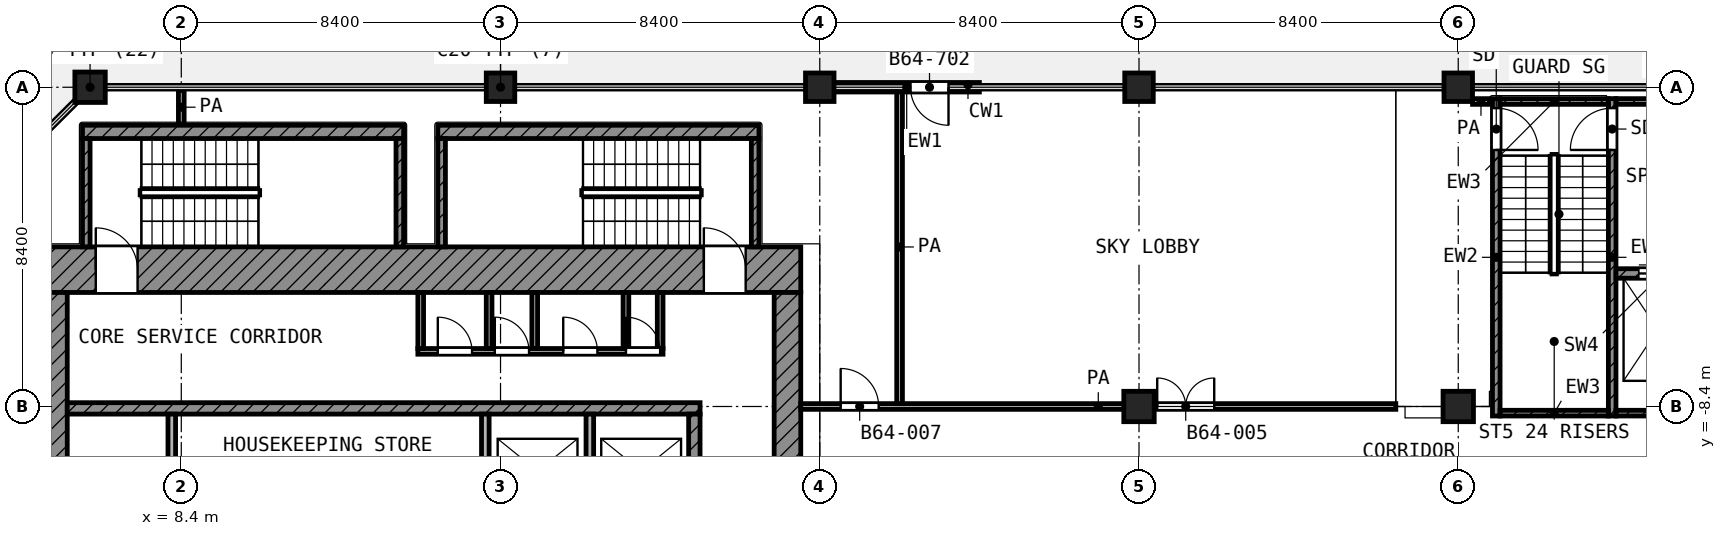
"""IFC4 building model, lengths in metres.
Left out: names, types, materials, properties, quantities, classifications, styles, units other than length and angle.
Written with IfcOpenShell. Run it as: python <this file> out.ifc"""

import sys

from ifc_helpers import new_model, si_unit, direction, frame, frame_2d, origin, origin_2d, place, context, subcontext, project, spatial, rectangle, extrude, element, fill, save


model = new_model("IFC4")
c1 = context("Model", 3, precision=1e-05, world=origin(), true_north=direction((0.0, 1.0)))
c2 = subcontext(c1, "Body", "Model", "MODEL_VIEW")
j1 = project(units=[si_unit("LENGTHUNIT", "METRE"), si_unit("PLANEANGLEUNIT", "RADIAN")], contexts=[c1])
p1 = place(None, origin())
s1 = spatial("IfcSite", under=j1, at=p1, CompositionType="ELEMENT")
p2 = place(p1, origin())
s2 = spatial("IfcBuilding", under=s1, at=p2, CompositionType="ELEMENT")
p3 = place(p2, frame((0.0, 0.0, 277.6)))
s3 = spatial("IfcBuildingStorey", under=s2, at=p3, CompositionType="ELEMENT", Elevation=277.6)
p4 = place(p3, frame((6.0, 0.0, 0.0), z_axis=(0.0, 0.0, 1.0), x_axis=(1.0, 0.0, 0.0)))
e1 = element("IfcColumn", 1, at=p4, inside=s3, PredefinedType="COLUMN", context=c2, shape_type="SweptSolid", body=[
    extrude(rectangle(XDim=0.8, YDim=0.8, at=origin_2d()), origin(), (0.0, 0.0, 1.0), 4.2),
])
for number, where, z_axis, x_axis in (
    (2, (16.8, 0.0, 0.0), (0.0, 0.0, 1.0), (1.0, 0.0, 0.0)),
    (3, (25.2, 0.0, 0.0), (0.0, 0.0, 1.0), (1.0, 0.0, 0.0)),
    (4, (33.6, 0.0, 0.0), (0.0, 0.0, 1.0), (1.0, 0.0, 0.0)),
    (5, (42.0, 0.0, 0.0), (0.0, 0.0, 1.0), (1.0, 0.0, 0.0)),
):
    element("IfcColumn", number, at=place(p3, frame(where, z_axis=z_axis, x_axis=x_axis)), inside=s3, PredefinedType="COLUMN", context=c2, shape_type="SweptSolid", body=[
        extrude(rectangle(XDim=0.75, YDim=0.75, at=origin_2d()), origin(), (0.0, 0.0, 1.0), 4.2),
    ])
for number, where, z_axis, x_axis in (
    (6, (33.6, -8.4, 0.0), (0.0, 0.0, 1.0), (1.0, 0.0, 0.0)),
    (7, (42.0, -8.4, 0.0), (0.0, 0.0, 1.0), (1.0, 0.0, 0.0)),
):
    element("IfcColumn", number, at=place(p3, frame(where, z_axis=z_axis, x_axis=x_axis)), inside=s3, PredefinedType="COLUMN", context=c2, shape_type="SweptSolid", body=[
        extrude(rectangle(XDim=0.8, YDim=0.8, at=origin_2d()), origin(), (0.0, 0.0, 1.0), 4.2),
    ])
p5 = place(p3, frame((29.4, 0.0, 0.0), z_axis=(0.0, 0.0, 1.0), x_axis=(-1.0, 0.0, 0.0)))
e8 = element("IfcWall", 8, at=p5, inside=s3, PredefinedType="SOLIDWALL", context=c2, shape_type="SweptSolid", body=[
    extrude(rectangle(XDim=3.825, YDim=0.25, at=frame_2d((1.913, 0.0))), origin(), (0.0, 0.0, 1.0), 3.48),
])
p6 = place(p5, frame((0.812, 0.0, 0.0)))
e9 = element("IfcOpeningElement", 9, at=p6, cuts=e8, PredefinedType="OPENING", context=c2, shape_type="SweptSolid", body=[
    extrude(rectangle(XDim=1.0, YDim=2.1, at=frame_2d((0.5, 1.05))), frame((0.0, 0.135, 0.0), z_axis=(0.0, -1.0, 0.0), x_axis=(1.0, 0.0, 0.0)), (0.0, 0.0, 1.0), 0.27),
])
p7 = place(p3, frame((4.2, -4.8, 0.0), z_axis=(0.0, 0.0, 1.0), x_axis=(1.0, 0.0, 0.0)))
e10 = element("IfcWall", 10, at=p7, inside=s3, PredefinedType="SHEAR", context=c2, shape_type="SweptSolid", body=[
    extrude(rectangle(XDim=20.5, YDim=1.2, at=frame_2d((10.25, 0.0))), origin(), (0.0, 0.0, 1.0), 3.6),
])
p8 = place(p7, frame((1.95, 0.0, 0.0)))
e11 = element("IfcOpeningElement", 11, at=p8, cuts=e10, PredefinedType="OPENING", context=c2, shape_type="SweptSolid", body=[
    extrude(rectangle(XDim=1.1, YDim=2.1, at=frame_2d((0.55, 1.05))), frame((0.0, 0.61, 0.0), z_axis=(0.0, -1.0, 0.0), x_axis=(1.0, 0.0, 0.0)), (0.0, 0.0, 1.0), 1.22),
])
p9 = place(p7, frame((17.95, 0.0, 0.0)))
e12 = element("IfcOpeningElement", 12, at=p9, cuts=e10, PredefinedType="OPENING", context=c2, shape_type="SweptSolid", body=[
    extrude(rectangle(XDim=1.1, YDim=2.1, at=frame_2d((0.55, 1.05))), frame((0.0, 0.61, 0.0), z_axis=(0.0, -1.0, 0.0), x_axis=(1.0, 0.0, 0.0)), (0.0, 0.0, 1.0), 1.22),
])
p10 = place(p3, frame((4.8, -24.7, 0.0), z_axis=(0.0, 0.0, 1.0), x_axis=(0.0, 1.0, 0.0)))
e13 = element("IfcWall", 13, at=p10, inside=s3, PredefinedType="SHEAR", context=c2, shape_type="SweptSolid", body=[
    extrude(rectangle(XDim=19.3, YDim=1.2, at=frame_2d((9.65, 0.0))), origin(), (0.0, 0.0, 1.0), 3.6),
])
p11 = place(p10, frame((11.15, 0.0, 0.0)))
e14 = element("IfcOpeningElement", 14, at=p11, cuts=e13, PredefinedType="OPENING", context=c2, shape_type="SweptSolid", body=[
    extrude(rectangle(XDim=1.1, YDim=2.1, at=frame_2d((0.55, 1.05))), frame((0.0, 0.61, 0.0), z_axis=(0.0, -1.0, 0.0), x_axis=(1.0, 0.0, 0.0)), (0.0, 0.0, 1.0), 1.22),
])
p12 = place(p10, frame((1.85, 0.0, 0.0)))
e15 = element("IfcOpeningElement", 15, at=p12, cuts=e13, PredefinedType="OPENING", context=c2, shape_type="SweptSolid", body=[
    extrude(rectangle(XDim=1.1, YDim=2.1, at=frame_2d((0.55, 1.05))), frame((0.0, 0.61, 0.0), z_axis=(0.0, -1.0, 0.0), x_axis=(1.0, 0.0, 0.0)), (0.0, 0.0, 1.0), 1.22),
])
p13 = place(p3, frame((24.35, -24.0, 0.0), z_axis=(0.0, 0.0, 1.0), x_axis=(0.0, 1.0, 0.0)))
e16 = element("IfcWall", 16, at=p13, inside=s3, PredefinedType="SHEAR", context=c2, shape_type="SweptSolid", body=[
    extrude(rectangle(XDim=18.6, YDim=0.7, at=frame_2d((9.3, 0.0))), origin(), (0.0, 0.0, 1.0), 3.6),
])
p14 = place(p13, frame((10.5, 0.0, 0.0)))
e17 = element("IfcOpeningElement", 17, at=p14, cuts=e16, PredefinedType="OPENING", context=c2, shape_type="SweptSolid", body=[
    extrude(rectangle(XDim=1.8, YDim=2.1, at=frame_2d((0.9, 1.05))), frame((0.0, 0.36, 0.0), z_axis=(0.0, -1.0, 0.0), x_axis=(1.0, 0.0, 0.0)), (0.0, 0.0, 1.0), 0.72),
])
p15 = place(p3, frame((5.4, -8.45, 0.0), z_axis=(0.0, 0.0, 1.0), x_axis=(1.0, 0.0, 0.0)))
e18 = element("IfcWall", 18, at=p15, inside=s3, PredefinedType="SHEAR", context=c2, shape_type="SweptSolid", body=[
    extrude(rectangle(XDim=16.65, YDim=0.3, at=frame_2d((8.325, 0.0))), origin(), (0.0, 0.0, 1.0), 3.6),
])
p16 = place(p3, frame((21.9, -10.95, 0.0), z_axis=(0.0, 0.0, 1.0), x_axis=(0.0, 1.0, 0.0)))
e19 = element("IfcWall", 19, at=p16, inside=s3, PredefinedType="SHEAR", context=c2, shape_type="SweptSolid", body=[
    extrude(rectangle(XDim=2.35, YDim=0.3, at=frame_2d((1.175, 0.0))), origin(), (0.0, 0.0, 1.0), 3.6),
])
for number, where, z_axis, x_axis in (
    (20, (8.15, -10.95, 0.0), (0.0, 0.0, 1.0), (0.0, 1.0, 0.0)),
    (21, (16.4, -10.95, 0.0), (0.0, 0.0, 1.0), (0.0, 1.0, 0.0)),
    (22, (19.15, -10.95, 0.0), (0.0, 0.0, 1.0), (0.0, 1.0, 0.0)),
):
    element("IfcWall", number, at=place(p3, frame(where, z_axis=z_axis, x_axis=x_axis)), inside=s3, PredefinedType="PARTITIONING", context=c2, shape_type="SweptSolid", body=[
        extrude(rectangle(XDim=2.35, YDim=0.2, at=frame_2d((1.175, 0.0))), origin(), (0.0, 0.0, 1.0), 3.6),
    ])
p17 = place(p3, frame((14.625, -6.95, 0.0), z_axis=(0.0, 0.0, 1.0), x_axis=(1.0, 0.0, 0.0)))
e23 = element("IfcWall", 23, at=p17, inside=s3, PredefinedType="PARTITIONING", context=c2, shape_type="SweptSolid", body=[
    extrude(rectangle(XDim=6.45, YDim=0.15, at=frame_2d((3.225, 0.0))), origin(), (0.0, 0.0, 1.0), 3.6),
])
p18 = place(p17, frame((0.525, 0.0, 0.0)))
e24 = element("IfcOpeningElement", 24, at=p18, cuts=e23, PredefinedType="OPENING", context=c2, shape_type="SweptSolid", body=[
    extrude(rectangle(XDim=0.9, YDim=2.1, at=frame_2d((0.45, 1.05))), frame((0.0, 0.085, 0.0), z_axis=(0.0, -1.0, 0.0), x_axis=(1.0, 0.0, 0.0)), (0.0, 0.0, 1.0), 0.17),
])
p19 = place(p17, frame((2.025, 0.0, 0.0)))
e25 = element("IfcOpeningElement", 25, at=p19, cuts=e23, PredefinedType="OPENING", context=c2, shape_type="SweptSolid", body=[
    extrude(rectangle(XDim=0.9, YDim=2.1, at=frame_2d((0.45, 1.05))), frame((0.0, 0.085, 0.0), z_axis=(0.0, -1.0, 0.0), x_axis=(1.0, 0.0, 0.0)), (0.0, 0.0, 1.0), 0.17),
])
p20 = place(p17, frame((3.825, 0.0, 0.0)))
e26 = element("IfcOpeningElement", 26, at=p20, cuts=e23, PredefinedType="OPENING", context=c2, shape_type="SweptSolid", body=[
    extrude(rectangle(XDim=0.9, YDim=2.1, at=frame_2d((0.45, 1.05))), frame((0.0, 0.085, 0.0), z_axis=(0.0, -1.0, 0.0), x_axis=(1.0, 0.0, 0.0)), (0.0, 0.0, 1.0), 0.17),
])
p21 = place(p17, frame((5.475, 0.0, 0.0)))
e27 = element("IfcOpeningElement", 27, at=p21, cuts=e23, PredefinedType="OPENING", context=c2, shape_type="SweptSolid", body=[
    extrude(rectangle(XDim=0.9, YDim=2.1, at=frame_2d((0.45, 1.05))), frame((0.0, 0.085, 0.0), z_axis=(0.0, -1.0, 0.0), x_axis=(1.0, 0.0, 0.0)), (0.0, 0.0, 1.0), 0.17),
])
for number, where, z_axis, x_axis in (
    (28, (14.7, -6.875, 0.0), (0.0, 0.0, 1.0), (0.0, 1.0, 0.0)),
    (29, (16.5, -6.875, 0.0), (0.0, 0.0, 1.0), (0.0, 1.0, 0.0)),
    (30, (17.7, -6.875, 0.0), (0.0, 0.0, 1.0), (0.0, 1.0, 0.0)),
    (31, (20.1, -6.875, 0.0), (0.0, 0.0, 1.0), (0.0, 1.0, 0.0)),
    (32, (21.0, -6.875, 0.0), (0.0, 0.0, 1.0), (0.0, 1.0, 0.0)),
):
    element("IfcWall", number, at=place(p3, frame(where, z_axis=z_axis, x_axis=x_axis)), inside=s3, PredefinedType="PARTITIONING", context=c2, shape_type="SweptSolid", body=[
        extrude(rectangle(XDim=1.475, YDim=0.15, at=frame_2d((0.738, 0.0))), origin(), (0.0, 0.0, 1.0), 3.6),
    ])
p22 = place(p3, frame((5.8, -1.175, 0.0), z_axis=(0.0, 0.0, 1.0), x_axis=(1.0, 0.0, 0.0)))
e33 = element("IfcWall", 33, at=p22, inside=s3, PredefinedType="SHEAR", context=c2, shape_type="SweptSolid", body=[
    extrude(rectangle(XDim=8.45, YDim=0.35, at=frame_2d((4.225, 0.0))), origin(), (0.0, 0.0, 1.0), 3.6),
])
for number, where, z_axis, x_axis in (
    (34, (5.9, -4.2, 0.0), (0.0, 0.0, 1.0), (0.0, 1.0, 0.0)),
    (35, (14.15, -4.2, 0.0), (0.0, 0.0, 1.0), (0.0, 1.0, 0.0)),
):
    element("IfcWall", number, at=place(p3, frame(where, z_axis=z_axis, x_axis=x_axis)), inside=s3, PredefinedType="SHEAR", context=c2, shape_type="SweptSolid", body=[
        extrude(rectangle(XDim=2.85, YDim=0.2, at=frame_2d((1.425, 0.0))), origin(), (0.0, 0.0, 1.0), 3.6),
    ])
p23 = place(p3, frame((15.15, -1.175, 0.0), z_axis=(0.0, 0.0, 1.0), x_axis=(1.0, 0.0, 0.0)))
e36 = element("IfcWall", 36, at=p23, inside=s3, PredefinedType="SHEAR", context=c2, shape_type="SweptSolid", body=[
    extrude(rectangle(XDim=8.45, YDim=0.35, at=frame_2d((4.225, 0.0))), origin(), (0.0, 0.0, 1.0), 3.6),
])
for number, where, z_axis, x_axis in (
    (37, (15.25, -4.2, 0.0), (0.0, 0.0, 1.0), (0.0, 1.0, 0.0)),
    (38, (23.5, -4.2, 0.0), (0.0, 0.0, 1.0), (0.0, 1.0, 0.0)),
):
    element("IfcWall", number, at=place(p3, frame(where, z_axis=z_axis, x_axis=x_axis)), inside=s3, PredefinedType="SHEAR", context=c2, shape_type="SweptSolid", body=[
        extrude(rectangle(XDim=2.85, YDim=0.2, at=frame_2d((1.425, 0.0))), origin(), (0.0, 0.0, 1.0), 3.6),
    ])
p24 = place(p3, frame((43.0, -8.65, 0.0), z_axis=(0.0, 0.0, 1.0), x_axis=(0.0, 1.0, 0.0)))
e39 = element("IfcWall", 39, at=p24, inside=s3, PredefinedType="SHEAR", context=c2, shape_type="SweptSolid", body=[
    extrude(rectangle(XDim=8.35, YDim=0.2, at=frame_2d((4.175, 0.0))), origin(), (0.0, 0.0, 1.0), 3.6),
])
p25 = place(p24, frame((7.0, 0.0, 0.0)))
e40 = element("IfcOpeningElement", 40, at=p25, cuts=e39, PredefinedType="OPENING", context=c2, shape_type="SweptSolid", body=[
    extrude(rectangle(XDim=1.1, YDim=2.1, at=frame_2d((0.55, 1.05))), frame((0.0, 0.11, 0.0), z_axis=(0.0, -1.0, 0.0), x_axis=(1.0, 0.0, 0.0)), (0.0, 0.0, 1.0), 0.22),
])
p26 = place(p3, frame((46.05, -8.65, 0.0), z_axis=(0.0, 0.0, 1.0), x_axis=(0.0, 1.0, 0.0)))
e41 = element("IfcWall", 41, at=p26, inside=s3, PredefinedType="SHEAR", context=c2, shape_type="SweptSolid", body=[
    extrude(rectangle(XDim=8.35, YDim=0.2, at=frame_2d((4.175, 0.0))), origin(), (0.0, 0.0, 1.0), 3.6),
])
p27 = place(p26, frame((7.0, 0.0, 0.0)))
e42 = element("IfcOpeningElement", 42, at=p27, cuts=e41, PredefinedType="OPENING", context=c2, shape_type="SweptSolid", body=[
    extrude(rectangle(XDim=1.1, YDim=2.1, at=frame_2d((0.55, 1.05))), frame((0.0, 0.11, 0.0), z_axis=(0.0, -1.0, 0.0), x_axis=(1.0, 0.0, 0.0)), (0.0, 0.0, 1.0), 0.22),
])
p28 = place(p3, frame((43.1, -0.375, 0.0), z_axis=(0.0, 0.0, 1.0), x_axis=(1.0, 0.0, 0.0)))
e43 = element("IfcWall", 43, at=p28, inside=s3, PredefinedType="SHEAR", context=c2, shape_type="SweptSolid", body=[
    extrude(rectangle(XDim=2.85, YDim=0.15, at=frame_2d((1.425, 0.0))), origin(), (0.0, 0.0, 1.0), 3.6),
])
p29 = place(p3, frame((46.15, -0.375, 0.0), z_axis=(0.0, 0.0, 1.0), x_axis=(1.0, 0.0, 0.0)))
e44 = element("IfcWall", 44, at=p29, inside=s3, PredefinedType="SHEAR", context=c2, shape_type="SweptSolid", body=[
    extrude(rectangle(XDim=2.45, YDim=0.15, at=frame_2d((1.225, 0.0))), origin(), (0.0, 0.0, 1.0), 3.6),
])
p30 = place(p3, frame((43.1, -8.575, 0.0), z_axis=(0.0, 0.0, 1.0), x_axis=(1.0, 0.0, 0.0)))
e45 = element("IfcWall", 45, at=p30, inside=s3, PredefinedType="SHEAR", context=c2, shape_type="SweptSolid", body=[
    extrude(rectangle(XDim=2.85, YDim=0.15, at=frame_2d((1.425, 0.0))), origin(), (0.0, 0.0, 1.0), 3.6),
])
p31 = place(p3, frame((46.15, -8.575, 0.0), z_axis=(0.0, 0.0, 1.0), x_axis=(1.0, 0.0, 0.0)))
e46 = element("IfcWall", 46, at=p31, inside=s3, PredefinedType="SHEAR", context=c2, shape_type="SweptSolid", body=[
    extrude(rectangle(XDim=2.45, YDim=0.15, at=frame_2d((1.225, 0.0))), origin(), (0.0, 0.0, 1.0), 3.6),
])
p32 = place(p3, frame((46.15, -4.9, 0.0), z_axis=(0.0, 0.0, 1.0), x_axis=(1.0, 0.0, 0.0)))
e47 = element("IfcWall", 47, at=p32, inside=s3, PredefinedType="SHEAR", context=c2, shape_type="SweptSolid", body=[
    extrude(rectangle(XDim=2.45, YDim=0.25, at=frame_2d((1.225, 0.0))), origin(), (0.0, 0.0, 1.0), 3.6),
])
p33 = place(p32, frame((0.6, 0.0, 0.0)))
e48 = element("IfcOpeningElement", 48, at=p33, cuts=e47, PredefinedType="OPENING", context=c2, shape_type="SweptSolid", body=[
    extrude(rectangle(XDim=1.3, YDim=2.1, at=frame_2d((0.65, 1.05))), frame((0.0, 0.135, 0.0), z_axis=(0.0, -1.0, 0.0), x_axis=(1.0, 0.0, 0.0)), (0.0, 0.0, 1.0), 0.27),
])
p34 = place(p3, frame((24.7, -8.4, 0.0), z_axis=(0.0, 0.0, 1.0), x_axis=(1.0, 0.0, 0.0)))
e49 = element("IfcWall", 49, at=p34, inside=s3, PredefinedType="PARTITIONING", context=c2, shape_type="SweptSolid", body=[
    extrude(rectangle(XDim=15.657, YDim=0.15, at=frame_2d((7.829, 0.0))), origin(), (0.0, 0.0, 1.0), 3.6),
])
p35 = place(p34, frame((1.05, 0.0, 0.0)))
e50 = element("IfcOpeningElement", 50, at=p35, cuts=e49, PredefinedType="OPENING", context=c2, shape_type="SweptSolid", body=[
    extrude(rectangle(XDim=1.0, YDim=2.1, at=frame_2d((0.5, 1.05))), frame((0.0, 0.085, 0.0), z_axis=(0.0, -1.0, 0.0), x_axis=(1.0, 0.0, 0.0)), (0.0, 0.0, 1.0), 0.17),
])
p36 = place(p34, frame((9.379, 0.0, 0.0)))
e51 = element("IfcOpeningElement", 51, at=p36, cuts=e49, PredefinedType="OPENING", context=c2, shape_type="SweptSolid", body=[
    extrude(rectangle(XDim=1.5, YDim=2.1, at=frame_2d((0.75, 1.05))), frame((0.0, 0.085, 0.0), z_axis=(0.0, -1.0, 0.0), x_axis=(1.0, 0.0, 0.0)), (0.0, 0.0, 1.0), 0.17),
])
p37 = place(p3, frame((42.376, -0.375, 0.0), z_axis=(0.0, 0.0, 1.0), x_axis=(1.0, 0.0, 0.0)))
e52 = element("IfcWall", 52, at=p37, inside=s3, PredefinedType="PARTITIONING", context=c2, shape_type="SweptSolid", body=[
    extrude(rectangle(XDim=0.444, YDim=0.15, at=frame_2d((0.222, 0.0))), origin(), (0.0, 0.0, 1.0), 3.6),
])
p38 = place(p3, frame((8.4, -0.97, 0.0), z_axis=(0.0, 0.0, 1.0), x_axis=(0.0, 1.0, 0.0)))
e53 = element("IfcWall", 53, at=p38, inside=s3, PredefinedType="PARTITIONING", context=c2, shape_type="SweptSolid", body=[
    extrude(rectangle(XDim=0.89, YDim=0.15, at=frame_2d((0.445, 0.0))), origin(), (0.0, 0.0, 1.0), 3.6),
])
p39 = place(p3, frame((27.3, -8.325, 0.0), z_axis=(0.0, 0.0, 1.0), x_axis=(0.0, 1.0, 0.0)))
e54 = element("IfcWall", 54, at=p39, inside=s3, PredefinedType="PARTITIONING", context=c2, shape_type="SweptSolid", body=[
    extrude(rectangle(XDim=8.245, YDim=0.15, at=frame_2d((4.123, 0.0))), origin(), (0.0, 0.0, 1.0), 3.6),
])
p40 = place(p6, origin())
e55 = element("IfcDoor", 55, at=p40, inside=s3, OperationType="SINGLE_SWING_LEFT", PredefinedType="DOOR", context=c2, shape_type="SweptSolid", body=[
    extrude(rectangle(XDim=1.0, YDim=2.1, at=frame_2d((0.5, 1.05))), frame((0.0, 0.025, 0.0), z_axis=(0.0, -1.0, 0.0), x_axis=(1.0, 0.0, 0.0)), (0.0, 0.0, 1.0), 0.05),
])
fill(e9, e55)
p41 = place(p8, origin())
e56 = element("IfcDoor", 56, at=p41, inside=s3, OperationType="SINGLE_SWING_LEFT", PredefinedType="DOOR", context=c2, shape_type="SweptSolid", body=[
    extrude(rectangle(XDim=1.1, YDim=2.1, at=frame_2d((0.55, 1.05))), frame((0.0, 0.025, 0.0), z_axis=(0.0, -1.0, 0.0), x_axis=(1.0, 0.0, 0.0)), (0.0, 0.0, 1.0), 0.05),
])
fill(e11, e56)
p42 = place(p9, origin())
e57 = element("IfcDoor", 57, at=p42, inside=s3, OperationType="SINGLE_SWING_LEFT", PredefinedType="DOOR", context=c2, shape_type="SweptSolid", body=[
    extrude(rectangle(XDim=1.1, YDim=2.1, at=frame_2d((0.55, 1.05))), frame((0.0, 0.025, 0.0), z_axis=(0.0, -1.0, 0.0), x_axis=(1.0, 0.0, 0.0)), (0.0, 0.0, 1.0), 0.05),
])
fill(e12, e57)
p43 = place(p18, origin())
e58 = element("IfcDoor", 58, at=p43, inside=s3, OperationType="SINGLE_SWING_LEFT", PredefinedType="DOOR", context=c2, shape_type="SweptSolid", body=[
    extrude(rectangle(XDim=0.9, YDim=2.1, at=frame_2d((0.45, 1.05))), frame((0.0, 0.025, 0.0), z_axis=(0.0, -1.0, 0.0), x_axis=(1.0, 0.0, 0.0)), (0.0, 0.0, 1.0), 0.05),
])
fill(e24, e58)
p44 = place(p19, origin())
e59 = element("IfcDoor", 59, at=p44, inside=s3, OperationType="SINGLE_SWING_LEFT", PredefinedType="DOOR", context=c2, shape_type="SweptSolid", body=[
    extrude(rectangle(XDim=0.9, YDim=2.1, at=frame_2d((0.45, 1.05))), frame((0.0, 0.025, 0.0), z_axis=(0.0, -1.0, 0.0), x_axis=(1.0, 0.0, 0.0)), (0.0, 0.0, 1.0), 0.05),
])
fill(e25, e59)
p45 = place(p20, origin())
e60 = element("IfcDoor", 60, at=p45, inside=s3, OperationType="SINGLE_SWING_LEFT", PredefinedType="DOOR", context=c2, shape_type="SweptSolid", body=[
    extrude(rectangle(XDim=0.9, YDim=2.1, at=frame_2d((0.45, 1.05))), frame((0.0, 0.025, 0.0), z_axis=(0.0, -1.0, 0.0), x_axis=(1.0, 0.0, 0.0)), (0.0, 0.0, 1.0), 0.05),
])
fill(e26, e60)
p46 = place(p21, origin())
e61 = element("IfcDoor", 61, at=p46, inside=s3, OperationType="SINGLE_SWING_LEFT", PredefinedType="DOOR", context=c2, shape_type="SweptSolid", body=[
    extrude(rectangle(XDim=0.9, YDim=2.1, at=frame_2d((0.45, 1.05))), frame((0.0, 0.025, 0.0), z_axis=(0.0, -1.0, 0.0), x_axis=(1.0, 0.0, 0.0)), (0.0, 0.0, 1.0), 0.05),
])
fill(e27, e61)
p47 = place(p25, frame((1.1, 0.0, 0.0), z_axis=(0.0, 0.0, 1.0), x_axis=(-1.0, 0.0, 0.0)))
e62 = element("IfcDoor", 62, at=p47, inside=s3, OperationType="SINGLE_SWING_LEFT", PredefinedType="DOOR", context=c2, shape_type="SweptSolid", body=[
    extrude(rectangle(XDim=1.1, YDim=2.1, at=frame_2d((0.55, 1.05))), frame((0.0, 0.025, 0.0), z_axis=(0.0, -1.0, 0.0), x_axis=(1.0, 0.0, 0.0)), (0.0, 0.0, 1.0), 0.05),
])
fill(e40, e62)
p48 = place(p27, origin())
e63 = element("IfcDoor", 63, at=p48, inside=s3, OperationType="SINGLE_SWING_LEFT", PredefinedType="DOOR", context=c2, shape_type="SweptSolid", body=[
    extrude(rectangle(XDim=1.1, YDim=2.1, at=frame_2d((0.55, 1.05))), frame((0.0, 0.025, 0.0), z_axis=(0.0, -1.0, 0.0), x_axis=(1.0, 0.0, 0.0)), (0.0, 0.0, 1.0), 0.05),
])
fill(e42, e63)
p49 = place(p33, origin())
e64 = element("IfcDoor", 64, at=p49, inside=s3, OperationType="DOUBLE_DOOR_SLIDING", PredefinedType="DOOR", context=c2, shape_type="SweptSolid", body=[
    extrude(rectangle(XDim=1.3, YDim=2.1, at=frame_2d((0.65, 1.05))), frame((0.0, 0.025, 0.0), z_axis=(0.0, -1.0, 0.0), x_axis=(1.0, 0.0, 0.0)), (0.0, 0.0, 1.0), 0.05),
])
fill(e48, e64)
p50 = place(p35, origin())
e65 = element("IfcDoor", 65, at=p50, inside=s3, OperationType="SINGLE_SWING_LEFT", PredefinedType="DOOR", context=c2, shape_type="SweptSolid", body=[
    extrude(rectangle(XDim=1.0, YDim=2.1, at=frame_2d((0.5, 1.05))), frame((0.0, 0.025, 0.0), z_axis=(0.0, -1.0, 0.0), x_axis=(1.0, 0.0, 0.0)), (0.0, 0.0, 1.0), 0.05),
])
fill(e50, e65)
p51 = place(p36, origin())
e66 = element("IfcDoor", 66, at=p51, inside=s3, OperationType="DOUBLE_DOOR_SINGLE_SWING", PredefinedType="DOOR", context=c2, shape_type="SweptSolid", body=[
    extrude(rectangle(XDim=1.5, YDim=2.1, at=frame_2d((0.75, 1.05))), frame((0.0, 0.025, 0.0), z_axis=(0.0, -1.0, 0.0), x_axis=(1.0, 0.0, 0.0)), (0.0, 0.0, 1.0), 0.05),
])
fill(e51, e66)
save(model, sys.argv[1])
